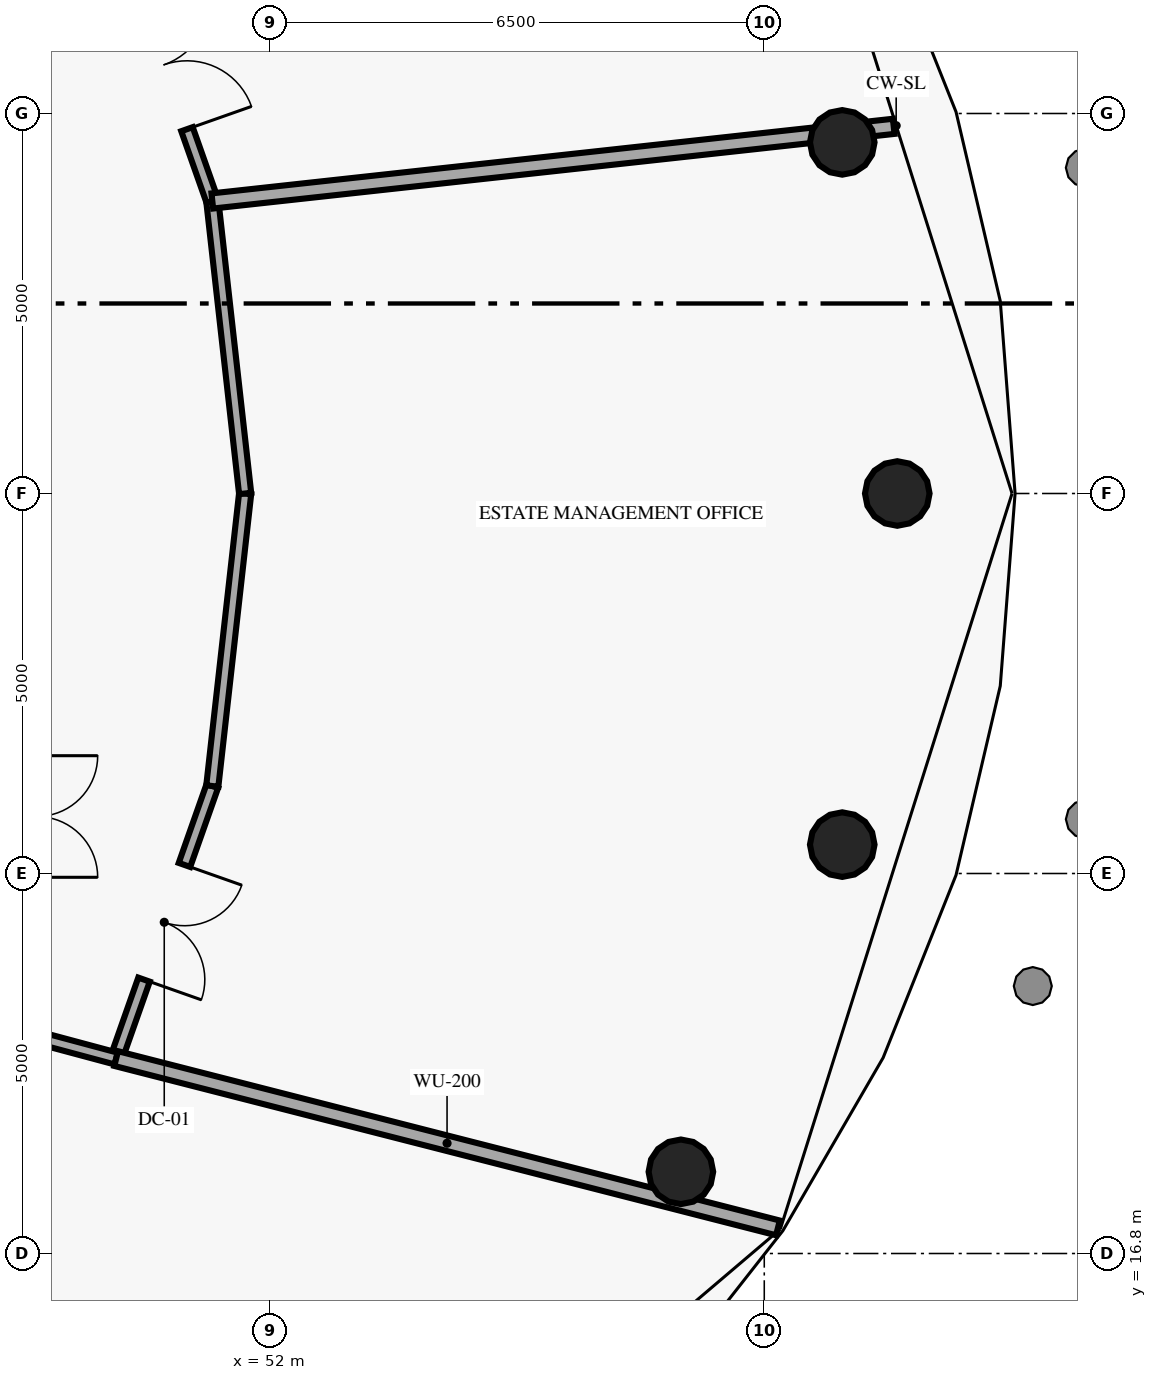
"""IFC4 building model, lengths in metres.
Left out: names, types, materials, properties, quantities, classifications, styles, units other than length and angle.
Written with IfcOpenShell. Run it as: python <this file> out.ifc"""

import sys

from ifc_helpers import new_model, si_unit, direction, frame, frame_2d, origin, origin_2d, place, context, subcontext, project, spatial, rectangle, circle, extrude, element, fill, save


model = new_model("IFC4")
c1 = context("Model", 3, precision=1e-05, world=origin(), true_north=direction((0.0, 1.0)))
c2 = subcontext(c1, "Body", "Model", "MODEL_VIEW")
j1 = project(units=[si_unit("LENGTHUNIT", "METRE"), si_unit("PLANEANGLEUNIT", "RADIAN")], contexts=[c1])
p1 = place(None, origin())
s1 = spatial("IfcSite", under=j1, at=p1, CompositionType="ELEMENT")
p2 = place(p1, origin())
s2 = spatial("IfcBuilding", under=s1, at=p2, CompositionType="ELEMENT")
p3 = place(p2, frame((0.0, 0.0, 203.15)))
s3 = spatial("IfcBuildingStorey", under=s2, at=p3, CompositionType="ELEMENT", Elevation=203.15)
for number, where, z_axis, x_axis in (
    (1, (60.25, 26.8, 0.0), (0.0, 0.0, 1.0), (1.0, 0.0, 0.0)),
    (2, (59.526, 31.42, 0.0), (0.0, 0.0, 1.0), (1.0, 0.0, 0.0)),
    (3, (57.403, 17.875, 0.0), (0.0, 0.0, 1.0), (1.0, 0.0, 0.0)),
    (4, (59.526, 22.18, 0.0), (0.0, 0.0, 1.0), (1.0, 0.0, 0.0)),
):
    element("IfcColumn", number, at=place(p3, frame(where, z_axis=z_axis, x_axis=x_axis)), inside=s3, PredefinedType="COLUMN", context=c2, shape_type="SweptSolid", body=[
        extrude(circle(Radius=0.425, at=origin_2d()), origin(), (0.0, 0.0, 1.0), 4.76),
    ])
p4 = place(p3, frame((51.238, 22.951, 0.0), z_axis=(0.0, 0.0, 1.0), x_axis=(-0.332705930675, -0.943030627124, 0.0)))
e5 = element("IfcWall", 5, at=p4, inside=s3, PredefinedType="PARTITIONING", context=c2, shape_type="SweptSolid", body=[
    extrude(rectangle(XDim=3.802, YDim=0.16, at=frame_2d((1.901, 0.0))), origin(), (0.0, 0.0, 1.0), 4.76),
])
p5 = place(p4, frame((1.101, 0.0, 0.0)))
e6 = element("IfcOpeningElement", 6, at=p5, cuts=e5, PredefinedType="OPENING", context=c2, shape_type="SweptSolid", body=[
    extrude(rectangle(XDim=1.6, YDim=2.2, at=frame_2d((0.8, 1.1))), frame((0.0, 0.09, 0.0), z_axis=(0.0, -1.0, 0.0), x_axis=(1.0, 0.0, 0.0)), (0.0, 0.0, 1.0), 0.18),
])
p6 = place(p3, frame((51.238, 22.951, 0.0), z_axis=(0.0, 0.0, 1.0), x_axis=(0.1115037761, 0.993764010173, 0.0)))
e7 = element("IfcWall", 7, at=p6, inside=s3, PredefinedType="PARTITIONING", context=c2, shape_type="SweptSolid", body=[
    extrude(rectangle(XDim=3.873, YDim=0.16, at=frame_2d((1.937, 0.0))), origin(), (0.0, 0.0, 1.0), 4.76),
])
p7 = place(p3, frame((51.67, 26.8, 0.0), z_axis=(0.0, 0.0, 1.0), x_axis=(-0.111510761023, 0.993763226416, 0.0)))
e8 = element("IfcWall", 8, at=p7, inside=s3, PredefinedType="PARTITIONING", context=c2, shape_type="SweptSolid", body=[
    extrude(rectangle(XDim=3.873, YDim=0.16, at=frame_2d((1.937, 0.0))), origin(), (0.0, 0.0, 1.0), 4.76),
])
p8 = place(p3, frame((49.973, 34.235, 0.0), z_axis=(0.0, 0.0, 1.0), x_axis=(0.332685787644, -0.943037733444, 0.0)))
e9 = element("IfcWall", 9, at=p8, inside=s3, PredefinedType="PARTITIONING", context=c2, shape_type="SweptSolid", body=[
    extrude(rectangle(XDim=3.803, YDim=0.16, at=frame_2d((1.901, 0.0))), origin(), (0.0, 0.0, 1.0), 4.76),
])
p9 = place(p8, frame((1.001, 0.0, 0.0)))
e10 = element("IfcOpeningElement", 10, at=p9, cuts=e9, PredefinedType="OPENING", context=c2, shape_type="SweptSolid", body=[
    extrude(rectangle(XDim=1.8, YDim=2.3, at=frame_2d((0.9, 1.15))), frame((0.0, 0.09, 0.0), z_axis=(0.0, -1.0, 0.0), x_axis=(1.0, 0.0, 0.0)), (0.0, 0.0, 1.0), 0.18),
])
p10 = place(p3, frame((48.873, 19.66, 0.0), z_axis=(0.0, 0.0, 1.0), x_axis=(0.965878165217, -0.258996853181, 0.0)))
e11 = element("IfcWall", 11, at=p10, inside=s3, PredefinedType="PARTITIONING", context=c2, shape_type="SweptSolid", body=[
    extrude(rectangle(XDim=1.139, YDim=0.16, at=frame_2d((0.569, 0.0))), origin(), (0.0, 0.0, 1.0), 4.76),
])
p11 = place(p3, frame((49.973, 19.365, 0.0), z_axis=(0.0, 0.0, 1.0), x_axis=(0.968785410772, -0.24790084283, 0.0)))
e12 = element("IfcWall", 12, at=p11, inside=s3, PredefinedType="PARTITIONING", context=c2, shape_type="SweptSolid", body=[
    extrude(rectangle(XDim=8.988, YDim=0.2, at=frame_2d((4.494, 0.0))), origin(), (0.0, 0.0, 1.0), 4.76),
])
p12 = place(p3, frame((51.238, 30.649, 0.0), z_axis=(0.0, 0.0, 1.0), x_axis=(0.994055496631, 0.108874559096, 0.0)))
e13 = element("IfcWall", 13, at=p12, inside=s3, PredefinedType="PARTITIONING", context=c2, shape_type="SweptSolid", body=[
    extrude(rectangle(XDim=8.331, YDim=0.2, at=frame_2d((4.165, 0.0))), origin(), (0.0, 0.0, 1.0), 4.76),
])
p13 = place(p3, frame((59.519, 31.556, 0.0), z_axis=(0.0, 0.0, 1.0), x_axis=(0.994008597854, 0.109301909368, 0.0)))
e14 = element("IfcWall", 14, at=p13, inside=s3, PredefinedType="PARTITIONING", context=c2, shape_type="SweptSolid", body=[
    extrude(rectangle(XDim=0.688, YDim=0.2, at=frame_2d((0.344, 0.0))), origin(), (0.0, 0.0, 1.0), 4.145),
])
p14 = place(p5, origin())
e15 = element("IfcDoor", 15, at=p14, inside=s3, OperationType="DOUBLE_DOOR_SINGLE_SWING", PredefinedType="DOOR", context=c2, shape_type="SweptSolid", body=[
    extrude(rectangle(XDim=1.6, YDim=2.2, at=frame_2d((0.8, 1.1))), frame((0.0, 0.025, 0.0), z_axis=(0.0, -1.0, 0.0), x_axis=(1.0, 0.0, 0.0)), (0.0, 0.0, 1.0), 0.05),
])
fill(e6, e15)
p15 = place(p9, origin())
e16 = element("IfcDoor", 16, at=p15, inside=s3, OperationType="DOUBLE_DOOR_SINGLE_SWING", PredefinedType="DOOR", context=c2, shape_type="SweptSolid", body=[
    extrude(rectangle(XDim=1.8, YDim=2.3, at=frame_2d((0.9, 1.15))), frame((0.0, 0.025, 0.0), z_axis=(0.0, -1.0, 0.0), x_axis=(1.0, 0.0, 0.0)), (0.0, 0.0, 1.0), 0.05),
])
fill(e10, e16)
save(model, sys.argv[1])
